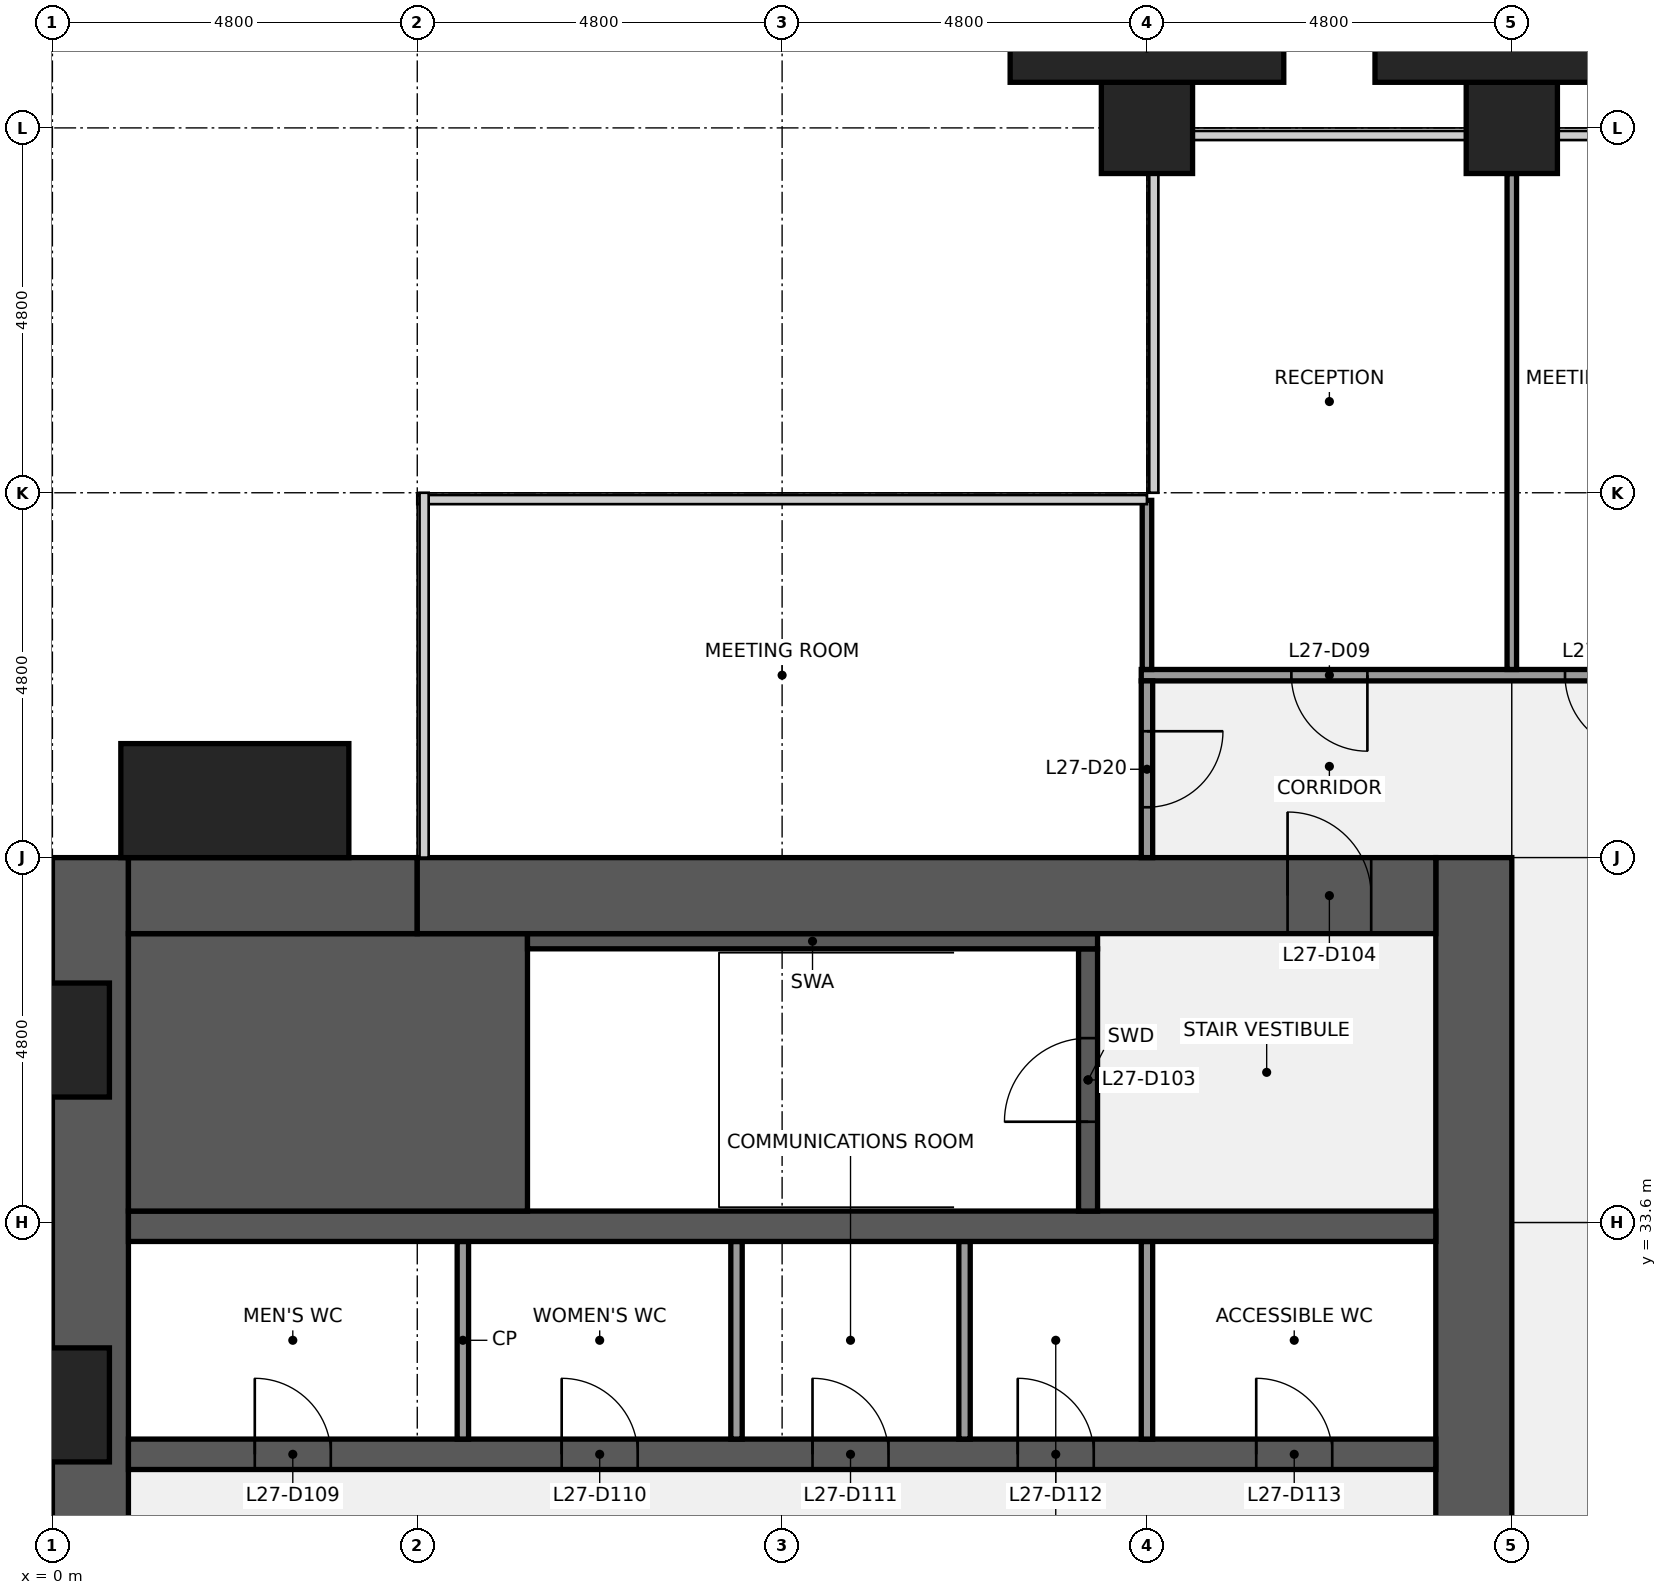
"""IFC4 building model, lengths in metres.
Left out: names, types, materials, properties, quantities, classifications, styles, units other than length and angle.
Written with IfcOpenShell. Run it as: python <this file> out.ifc"""

import sys

from ifc_helpers import new_model, si_unit, direction, frame, frame_2d, origin, origin_2d, place, context, subcontext, project, spatial, rectangle, extrude, element, fill, save


model = new_model("IFC4")
c1 = context("Model", 3, precision=1e-05, world=origin(), true_north=direction((0.0, 1.0)))
c2 = subcontext(c1, "Body", "Model", "MODEL_VIEW")
j1 = project(units=[si_unit("LENGTHUNIT", "METRE"), si_unit("PLANEANGLEUNIT", "RADIAN")], contexts=[c1])
p1 = place(None, origin())
s1 = spatial("IfcSite", under=j1, at=p1, CompositionType="ELEMENT")
p2 = place(p1, origin())
s2 = spatial("IfcBuilding", under=s1, at=p2, CompositionType="ELEMENT")
p3 = place(p2, frame((0.0, 0.0, 128.1)))
s3 = spatial("IfcBuildingStorey", under=s2, at=p3, CompositionType="ELEMENT", Elevation=128.1)
for number, where, z_axis, x_axis in (
    (1, (14.4, 48.0, 0.0), (0.0, 0.0, 1.0), (1.0, 0.0, 0.0)),
    (2, (19.2, 48.0, 0.0), (0.0, 0.0, 1.0), (1.0, 0.0, 0.0)),
):
    element("IfcColumn", number, at=place(p3, frame(where, z_axis=z_axis, x_axis=x_axis)), inside=s3, PredefinedType="COLUMN", context=c2, shape_type="SweptSolid", body=[
        extrude(rectangle(XDim=1.2, YDim=1.2, at=origin_2d()), origin(), (0.0, 0.0, 1.0), 4.0),
    ])
p4 = place(p3, frame((0.5, 9.6, 0.0), z_axis=(0.0, 0.0, 1.0), x_axis=(0.0, 1.0, 0.0)))
e3 = element("IfcWall", 3, at=p4, inside=s3, PredefinedType="SHEAR", context=c2, shape_type="SweptSolid", body=[
    extrude(rectangle(XDim=28.8, YDim=1.0, at=frame_2d((14.4, 0.0))), origin(), (0.0, 0.0, 1.0), 3.84),
])
p5 = place(p4, frame((8.85, 0.0, 0.9)))
e4 = element("IfcOpeningElement", 4, at=p5, cuts=e3, PredefinedType="OPENING", context=c2, shape_type="SweptSolid", body=[
    extrude(rectangle(XDim=1.5, YDim=1.5, at=frame_2d((0.75, 0.75))), frame((0.0, 0.51, 0.0), z_axis=(0.0, -1.0, 0.0), x_axis=(1.0, 0.0, 0.0)), (0.0, 0.0, 1.0), 1.02),
])
p6 = place(p4, frame((18.45, 0.0, 0.9)))
e5 = element("IfcOpeningElement", 5, at=p6, cuts=e3, PredefinedType="OPENING", context=c2, shape_type="SweptSolid", body=[
    extrude(rectangle(XDim=1.5, YDim=1.5, at=frame_2d((0.75, 0.75))), frame((0.0, 0.51, 0.0), z_axis=(0.0, -1.0, 0.0), x_axis=(1.0, 0.0, 0.0)), (0.0, 0.0, 1.0), 1.02),
])
p7 = place(p3, frame((18.7, 38.4, 0.0), z_axis=(0.0, 0.0, 1.0), x_axis=(0.0, -1.0, 0.0)))
e6 = element("IfcWall", 6, at=p7, inside=s3, PredefinedType="SHEAR", context=c2, shape_type="SweptSolid", body=[
    extrude(rectangle(XDim=28.8, YDim=1.0, at=frame_2d((14.4, 0.0))), origin(), (0.0, 0.0, 1.0), 3.84),
])
p8 = place(p7, frame((18.3, 0.0, 0.0)))
e7 = element("IfcOpeningElement", 7, at=p8, cuts=e6, PredefinedType="OPENING", context=c2, shape_type="SweptSolid", body=[
    extrude(rectangle(XDim=1.8, YDim=2.1, at=frame_2d((0.9, 1.05))), frame((0.0, 0.51, 0.0), z_axis=(0.0, -1.0, 0.0), x_axis=(1.0, 0.0, 0.0)), (0.0, 0.0, 1.0), 1.02),
])
p9 = place(p7, frame((8.7, 0.0, 0.0)))
e8 = element("IfcOpeningElement", 8, at=p9, cuts=e6, PredefinedType="OPENING", context=c2, shape_type="SweptSolid", body=[
    extrude(rectangle(XDim=1.8, YDim=2.1, at=frame_2d((0.9, 1.05))), frame((0.0, 0.51, 0.0), z_axis=(0.0, -1.0, 0.0), x_axis=(1.0, 0.0, 0.0)), (0.0, 0.0, 1.0), 1.02),
])
p10 = place(p3, frame((1.0, 30.55, 0.0), z_axis=(0.0, 0.0, 1.0), x_axis=(1.0, 0.0, 0.0)))
e9 = element("IfcWall", 9, at=p10, inside=s3, PredefinedType="SHEAR", context=c2, shape_type="SweptSolid", body=[
    extrude(rectangle(XDim=17.2, YDim=0.4, at=frame_2d((8.6, 0.0))), origin(), (0.0, 0.0, 1.0), 3.84),
])
p11 = place(p10, frame((1.663, 0.0, 0.0)))
e10 = element("IfcOpeningElement", 10, at=p11, cuts=e9, PredefinedType="OPENING", context=c2, shape_type="SweptSolid", body=[
    extrude(rectangle(XDim=1.0, YDim=2.1, at=frame_2d((0.5, 1.05))), frame((0.0, 0.21, 0.0), z_axis=(0.0, -1.0, 0.0), x_axis=(1.0, 0.0, 0.0)), (0.0, 0.0, 1.0), 0.42),
])
p12 = place(p10, frame((5.7, 0.0, 0.0)))
e11 = element("IfcOpeningElement", 11, at=p12, cuts=e9, PredefinedType="OPENING", context=c2, shape_type="SweptSolid", body=[
    extrude(rectangle(XDim=1.0, YDim=2.1, at=frame_2d((0.5, 1.05))), frame((0.0, 0.21, 0.0), z_axis=(0.0, -1.0, 0.0), x_axis=(1.0, 0.0, 0.0)), (0.0, 0.0, 1.0), 0.42),
])
p13 = place(p10, frame((9.0, 0.0, 0.0)))
e12 = element("IfcOpeningElement", 12, at=p13, cuts=e9, PredefinedType="OPENING", context=c2, shape_type="SweptSolid", body=[
    extrude(rectangle(XDim=1.0, YDim=2.1, at=frame_2d((0.5, 1.05))), frame((0.0, 0.21, 0.0), z_axis=(0.0, -1.0, 0.0), x_axis=(1.0, 0.0, 0.0)), (0.0, 0.0, 1.0), 0.42),
])
p14 = place(p10, frame((11.7, 0.0, 0.0)))
e13 = element("IfcOpeningElement", 13, at=p14, cuts=e9, PredefinedType="OPENING", context=c2, shape_type="SweptSolid", body=[
    extrude(rectangle(XDim=1.0, YDim=2.1, at=frame_2d((0.5, 1.05))), frame((0.0, 0.21, 0.0), z_axis=(0.0, -1.0, 0.0), x_axis=(1.0, 0.0, 0.0)), (0.0, 0.0, 1.0), 0.42),
])
p15 = place(p10, frame((14.837, 0.0, 0.0)))
e14 = element("IfcOpeningElement", 14, at=p15, cuts=e9, PredefinedType="OPENING", context=c2, shape_type="SweptSolid", body=[
    extrude(rectangle(XDim=1.0, YDim=2.1, at=frame_2d((0.5, 1.05))), frame((0.0, 0.21, 0.0), z_axis=(0.0, -1.0, 0.0), x_axis=(1.0, 0.0, 0.0)), (0.0, 0.0, 1.0), 0.42),
])
for number, where, z_axis, x_axis in (
    (15, (5.4, 30.75, 0.0), (0.0, 0.0, 1.0), (0.0, 1.0, 0.0)),
    (16, (9.0, 30.75, 0.0), (0.0, 0.0, 1.0), (0.0, 1.0, 0.0)),
    (17, (12.0, 30.75, 0.0), (0.0, 0.0, 1.0), (0.0, 1.0, 0.0)),
    (18, (14.4, 30.75, 0.0), (0.0, 0.0, 1.0), (0.0, 1.0, 0.0)),
):
    element("IfcWall", number, at=place(p3, frame(where, z_axis=z_axis, x_axis=x_axis)), inside=s3, PredefinedType="PARTITIONING", context=c2, shape_type="SweptSolid", body=[
        extrude(rectangle(XDim=2.6, YDim=0.15, at=frame_2d((1.3, 0.0))), origin(), (0.0, 0.0, 1.0), 3.84),
    ])
p16 = place(p3, frame((1.0, 33.55, 0.0), z_axis=(0.0, 0.0, 1.0), x_axis=(1.0, 0.0, 0.0)))
e19 = element("IfcWall", 19, at=p16, inside=s3, PredefinedType="SHEAR", context=c2, shape_type="SweptSolid", body=[
    extrude(rectangle(XDim=17.2, YDim=0.4, at=frame_2d((8.6, 0.0))), origin(), (0.0, 0.0, 1.0), 3.84),
])
p17 = place(p3, frame((1.0, 35.575, 0.0), z_axis=(0.0, 0.0, 1.0), x_axis=(1.0, 0.0, 0.0)))
e20 = element("IfcWall", 20, at=p17, inside=s3, PredefinedType="SHEAR", context=c2, shape_type="SweptSolid", body=[
    extrude(rectangle(XDim=5.25, YDim=3.65, at=frame_2d((2.625, 0.0))), origin(), (0.0, 0.0, 1.0), 3.84),
])
p18 = place(p3, frame((13.625, 33.75, 0.0), z_axis=(0.0, 0.0, 1.0), x_axis=(0.0, 1.0, 0.0)))
e21 = element("IfcWall", 21, at=p18, inside=s3, PredefinedType="SHEAR", context=c2, shape_type="SweptSolid", body=[
    extrude(rectangle(XDim=3.45, YDim=0.25, at=frame_2d((1.725, 0.0))), origin(), (0.0, 0.0, 1.0), 3.84),
])
p19 = place(p18, frame((1.175, 0.0, 0.0)))
e22 = element("IfcOpeningElement", 22, at=p19, cuts=e21, PredefinedType="OPENING", context=c2, shape_type="SweptSolid", body=[
    extrude(rectangle(XDim=1.1, YDim=2.1, at=frame_2d((0.55, 1.05))), frame((0.0, 0.135, 0.0), z_axis=(0.0, -1.0, 0.0), x_axis=(1.0, 0.0, 0.0)), (0.0, 0.0, 1.0), 0.27),
])
p20 = place(p3, frame((6.25, 37.3, 0.0), z_axis=(0.0, 0.0, 1.0), x_axis=(1.0, 0.0, 0.0)))
e23 = element("IfcWall", 23, at=p20, inside=s3, PredefinedType="SHEAR", context=c2, shape_type="SweptSolid", body=[
    extrude(rectangle(XDim=7.5, YDim=0.2, at=frame_2d((3.75, 0.0))), origin(), (0.0, 0.0, 1.0), 3.84),
])
p21 = place(p3, frame((1.0, 37.9, 0.0), z_axis=(0.0, 0.0, 1.0), x_axis=(1.0, 0.0, 0.0)))
e24 = element("IfcWall", 24, at=p21, inside=s3, PredefinedType="SHEAR", context=c2, shape_type="SweptSolid", body=[
    extrude(rectangle(XDim=3.8, YDim=1.0, at=frame_2d((1.9, 0.0))), origin(), (0.0, 0.0, 1.0), 3.84),
])
p22 = place(p3, frame((4.8, 37.9, 0.0), z_axis=(0.0, 0.0, 1.0), x_axis=(1.0, 0.0, 0.0)))
e25 = element("IfcWall", 25, at=p22, inside=s3, PredefinedType="SHEAR", context=c2, shape_type="SweptSolid", body=[
    extrude(rectangle(XDim=13.4, YDim=1.0, at=frame_2d((6.7, 0.0))), origin(), (0.0, 0.0, 1.0), 3.84),
])
p23 = place(p22, frame((11.45, 0.0, 0.0)))
e26 = element("IfcOpeningElement", 26, at=p23, cuts=e25, PredefinedType="OPENING", context=c2, shape_type="SweptSolid", body=[
    extrude(rectangle(XDim=1.1, YDim=2.1, at=frame_2d((0.55, 1.05))), frame((0.0, 0.51, 0.0), z_axis=(0.0, -1.0, 0.0), x_axis=(1.0, 0.0, 0.0)), (0.0, 0.0, 1.0), 1.02),
])
p24 = place(p3, frame((14.325, 40.8, 0.0), z_axis=(0.0, 0.0, 1.0), x_axis=(1.0, 0.0, 0.0)))
e27 = element("IfcWall", 27, at=p24, inside=s3, PredefinedType="PARTITIONING", context=c2, shape_type="SweptSolid", body=[
    extrude(rectangle(XDim=28.95, YDim=0.15, at=frame_2d((14.475, 0.0))), origin(), (0.0, 0.0, 1.0), 2.936),
])
p25 = place(p24, frame((1.975, 0.0, 0.0)))
e28 = element("IfcOpeningElement", 28, at=p25, cuts=e27, PredefinedType="OPENING", context=c2, shape_type="SweptSolid", body=[
    extrude(rectangle(XDim=1.0, YDim=2.1, at=frame_2d((0.5, 1.05))), frame((0.0, 0.085, 0.0), z_axis=(0.0, -1.0, 0.0), x_axis=(1.0, 0.0, 0.0)), (0.0, 0.0, 1.0), 0.17),
])
p26 = place(p24, frame((5.575, 0.0, 0.0)))
e29 = element("IfcOpeningElement", 29, at=p26, cuts=e27, PredefinedType="OPENING", context=c2, shape_type="SweptSolid", body=[
    extrude(rectangle(XDim=1.0, YDim=2.1, at=frame_2d((0.5, 1.05))), frame((0.0, 0.085, 0.0), z_axis=(0.0, -1.0, 0.0), x_axis=(1.0, 0.0, 0.0)), (0.0, 0.0, 1.0), 0.17),
])
p27 = place(p24, frame((9.175, 0.0, 0.0)))
e30 = element("IfcOpeningElement", 30, at=p27, cuts=e27, PredefinedType="OPENING", context=c2, shape_type="SweptSolid", body=[
    extrude(rectangle(XDim=1.0, YDim=2.1, at=frame_2d((0.5, 1.05))), frame((0.0, 0.085, 0.0), z_axis=(0.0, -1.0, 0.0), x_axis=(1.0, 0.0, 0.0)), (0.0, 0.0, 1.0), 0.17),
])
p28 = place(p24, frame((12.775, 0.0, 0.0)))
e31 = element("IfcOpeningElement", 31, at=p28, cuts=e27, PredefinedType="OPENING", context=c2, shape_type="SweptSolid", body=[
    extrude(rectangle(XDim=1.0, YDim=2.1, at=frame_2d((0.5, 1.05))), frame((0.0, 0.085, 0.0), z_axis=(0.0, -1.0, 0.0), x_axis=(1.0, 0.0, 0.0)), (0.0, 0.0, 1.0), 0.17),
])
p29 = place(p24, frame((15.175, 0.0, 0.0)))
e32 = element("IfcOpeningElement", 32, at=p29, cuts=e27, PredefinedType="OPENING", context=c2, shape_type="SweptSolid", body=[
    extrude(rectangle(XDim=1.0, YDim=2.1, at=frame_2d((0.5, 1.05))), frame((0.0, 0.085, 0.0), z_axis=(0.0, -1.0, 0.0), x_axis=(1.0, 0.0, 0.0)), (0.0, 0.0, 1.0), 0.17),
])
p30 = place(p24, frame((19.975, 0.0, 0.0)))
e33 = element("IfcOpeningElement", 33, at=p30, cuts=e27, PredefinedType="OPENING", context=c2, shape_type="SweptSolid", body=[
    extrude(rectangle(XDim=1.0, YDim=2.1, at=frame_2d((0.5, 1.05))), frame((0.0, 0.085, 0.0), z_axis=(0.0, -1.0, 0.0), x_axis=(1.0, 0.0, 0.0)), (0.0, 0.0, 1.0), 0.17),
])
p31 = place(p24, frame((25.975, 0.0, 0.0)))
e34 = element("IfcOpeningElement", 34, at=p31, cuts=e27, PredefinedType="OPENING", context=c2, shape_type="SweptSolid", body=[
    extrude(rectangle(XDim=1.0, YDim=2.1, at=frame_2d((0.5, 1.05))), frame((0.0, 0.085, 0.0), z_axis=(0.0, -1.0, 0.0), x_axis=(1.0, 0.0, 0.0)), (0.0, 0.0, 1.0), 0.17),
])
p32 = place(p3, frame((14.4, 40.875, 0.0), z_axis=(0.0, 0.0, 1.0), x_axis=(0.0, 1.0, 0.0)))
e35 = element("IfcWall", 35, at=p32, inside=s3, PredefinedType="PARTITIONING", context=c2, shape_type="SweptSolid", body=[
    extrude(rectangle(XDim=2.225, YDim=0.125, at=frame_2d((1.113, 0.0))), origin(), (0.0, 0.0, 1.0), 2.936),
])
p33 = place(p3, frame((14.4, 38.4, 0.0), z_axis=(0.0, 0.0, 1.0), x_axis=(0.0, 1.0, 0.0)))
e36 = element("IfcWall", 36, at=p33, inside=s3, PredefinedType="PARTITIONING", context=c2, shape_type="SweptSolid", body=[
    extrude(rectangle(XDim=2.325, YDim=0.15, at=frame_2d((1.163, 0.0))), origin(), (0.0, 0.0, 1.0), 2.936),
])
p34 = place(p33, frame((0.663, 0.0, 0.0)))
e37 = element("IfcOpeningElement", 37, at=p34, cuts=e36, PredefinedType="OPENING", context=c2, shape_type="SweptSolid", body=[
    extrude(rectangle(XDim=1.0, YDim=2.1, at=frame_2d((0.5, 1.05))), frame((0.0, 0.085, 0.0), z_axis=(0.0, -1.0, 0.0), x_axis=(1.0, 0.0, 0.0)), (0.0, 0.0, 1.0), 0.17),
])
p35 = place(p3, frame((19.2, 40.875, 0.0), z_axis=(0.0, 0.0, 1.0), x_axis=(0.0, 1.0, 0.0)))
e38 = element("IfcWall", 38, at=p35, inside=s3, PredefinedType="PARTITIONING", context=c2, shape_type="SweptSolid", body=[
    extrude(rectangle(XDim=6.525, YDim=0.125, at=frame_2d((3.262, 0.0))), origin(), (0.0, 0.0, 1.0), 2.936),
])
p36 = place(p3, frame((2.4, 39.15, 0.0), z_axis=(0.0, 0.0, 1.0), x_axis=(1.0, 0.0, 0.0)))
e39 = element("IfcColumn", 39, at=p36, inside=s3, PredefinedType="PILASTER", context=c2, shape_type="SweptSolid", body=[
    extrude(rectangle(XDim=3.0, YDim=1.5, at=origin_2d()), origin(), (0.0, 0.0, 1.0), 4.0),
])
for number, where, z_axis, x_axis in (
    (40, (14.4, 49.05, 0.0), (0.0, 0.0, 1.0), (1.0, 0.0, 0.0)),
    (41, (19.2, 49.05, 0.0), (0.0, 0.0, 1.0), (1.0, 0.0, 0.0)),
):
    element("IfcColumn", number, at=place(p3, frame(where, z_axis=z_axis, x_axis=x_axis)), inside=s3, PredefinedType="PILASTER", context=c2, shape_type="SweptSolid", body=[
        extrude(rectangle(XDim=3.6, YDim=0.9, at=origin_2d()), origin(), (0.0, 0.0, 1.0), 4.0),
    ])
p37 = place(p19, origin())
e42 = element("IfcDoor", 42, at=p37, inside=s3, OperationType="SINGLE_SWING_LEFT", PredefinedType="DOOR", context=c2, shape_type="SweptSolid", body=[
    extrude(rectangle(XDim=1.1, YDim=2.1, at=frame_2d((0.55, 1.05))), frame((0.0, 0.025, 0.0), z_axis=(0.0, -1.0, 0.0), x_axis=(1.0, 0.0, 0.0)), (0.0, 0.0, 1.0), 0.05),
])
fill(e22, e42)
p38 = place(p23, origin())
e43 = element("IfcDoor", 43, at=p38, inside=s3, OperationType="SINGLE_SWING_LEFT", PredefinedType="DOOR", context=c2, shape_type="SweptSolid", body=[
    extrude(rectangle(XDim=1.1, YDim=2.1, at=frame_2d((0.55, 1.05))), frame((0.0, 0.025, 0.0), z_axis=(0.0, -1.0, 0.0), x_axis=(1.0, 0.0, 0.0)), (0.0, 0.0, 1.0), 0.05),
])
fill(e26, e43)
p39 = place(p11, origin())
e44 = element("IfcDoor", 44, at=p39, inside=s3, OperationType="SINGLE_SWING_LEFT", PredefinedType="DOOR", context=c2, shape_type="SweptSolid", body=[
    extrude(rectangle(XDim=1.0, YDim=2.1, at=frame_2d((0.5, 1.05))), frame((0.0, 0.025, 0.0), z_axis=(0.0, -1.0, 0.0), x_axis=(1.0, 0.0, 0.0)), (0.0, 0.0, 1.0), 0.05),
])
fill(e10, e44)
p40 = place(p12, origin())
e45 = element("IfcDoor", 45, at=p40, inside=s3, OperationType="SINGLE_SWING_LEFT", PredefinedType="DOOR", context=c2, shape_type="SweptSolid", body=[
    extrude(rectangle(XDim=1.0, YDim=2.1, at=frame_2d((0.5, 1.05))), frame((0.0, 0.025, 0.0), z_axis=(0.0, -1.0, 0.0), x_axis=(1.0, 0.0, 0.0)), (0.0, 0.0, 1.0), 0.05),
])
fill(e11, e45)
p41 = place(p13, origin())
e46 = element("IfcDoor", 46, at=p41, inside=s3, OperationType="SINGLE_SWING_LEFT", PredefinedType="DOOR", context=c2, shape_type="SweptSolid", body=[
    extrude(rectangle(XDim=1.0, YDim=2.1, at=frame_2d((0.5, 1.05))), frame((0.0, 0.025, 0.0), z_axis=(0.0, -1.0, 0.0), x_axis=(1.0, 0.0, 0.0)), (0.0, 0.0, 1.0), 0.05),
])
fill(e12, e46)
p42 = place(p14, origin())
e47 = element("IfcDoor", 47, at=p42, inside=s3, OperationType="SINGLE_SWING_LEFT", PredefinedType="DOOR", context=c2, shape_type="SweptSolid", body=[
    extrude(rectangle(XDim=1.0, YDim=2.1, at=frame_2d((0.5, 1.05))), frame((0.0, 0.025, 0.0), z_axis=(0.0, -1.0, 0.0), x_axis=(1.0, 0.0, 0.0)), (0.0, 0.0, 1.0), 0.05),
])
fill(e13, e47)
p43 = place(p15, origin())
e48 = element("IfcDoor", 48, at=p43, inside=s3, OperationType="SINGLE_SWING_LEFT", PredefinedType="DOOR", context=c2, shape_type="SweptSolid", body=[
    extrude(rectangle(XDim=1.0, YDim=2.1, at=frame_2d((0.5, 1.05))), frame((0.0, 0.025, 0.0), z_axis=(0.0, -1.0, 0.0), x_axis=(1.0, 0.0, 0.0)), (0.0, 0.0, 1.0), 0.05),
])
fill(e14, e48)
p44 = place(p25, origin())
e49 = element("IfcDoor", 49, at=p44, inside=s3, OperationType="SINGLE_SWING_RIGHT", PredefinedType="DOOR", context=c2, shape_type="SweptSolid", body=[
    extrude(rectangle(XDim=1.0, YDim=2.1, at=frame_2d((0.5, 1.05))), frame((0.0, 0.025, 0.0), z_axis=(0.0, -1.0, 0.0), x_axis=(1.0, 0.0, 0.0)), (0.0, 0.0, 1.0), 0.05),
])
fill(e28, e49)
p45 = place(p26, origin())
e50 = element("IfcDoor", 50, at=p45, inside=s3, OperationType="SINGLE_SWING_RIGHT", PredefinedType="DOOR", context=c2, shape_type="SweptSolid", body=[
    extrude(rectangle(XDim=1.0, YDim=2.1, at=frame_2d((0.5, 1.05))), frame((0.0, 0.025, 0.0), z_axis=(0.0, -1.0, 0.0), x_axis=(1.0, 0.0, 0.0)), (0.0, 0.0, 1.0), 0.05),
])
fill(e29, e50)
p46 = place(p34, origin())
e51 = element("IfcDoor", 51, at=p46, inside=s3, OperationType="SINGLE_SWING_RIGHT", PredefinedType="DOOR", context=c2, shape_type="SweptSolid", body=[
    extrude(rectangle(XDim=1.0, YDim=2.1, at=frame_2d((0.5, 1.05))), frame((0.0, 0.025, 0.0), z_axis=(0.0, -1.0, 0.0), x_axis=(1.0, 0.0, 0.0)), (0.0, 0.0, 1.0), 0.05),
])
fill(e37, e51)
save(model, sys.argv[1])
